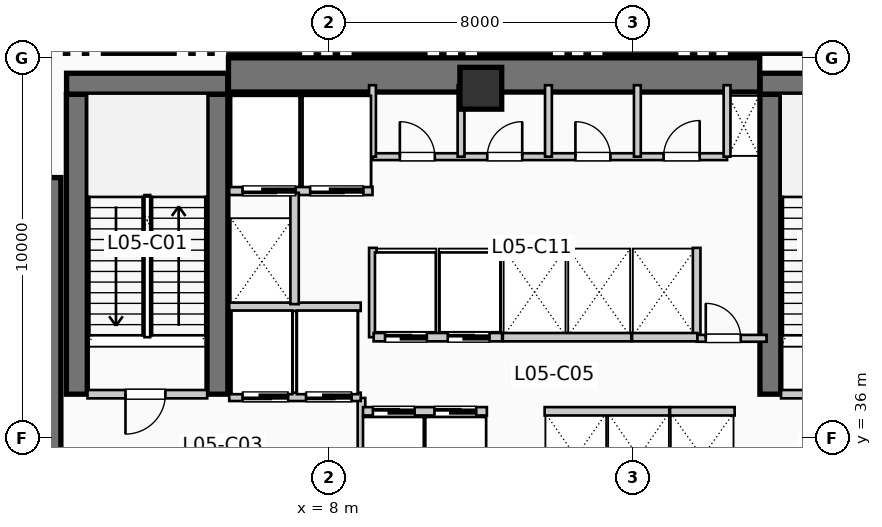
"""IFC4 building model, lengths in metres.
Left out: names, types, materials, properties, quantities, classifications, styles, units other than length and angle.
Written with IfcOpenShell. Run it as: python <this file> out.ifc"""

import sys

from ifc_helpers import new_model, si_unit, direction, frame, frame_2d, origin, origin_2d, place, context, subcontext, project, spatial, rectangle, extrude, element, fill, save


model = new_model("IFC4")
c1 = context("Model", 3, precision=1e-05, world=origin(), true_north=direction((0.0, 1.0)))
c2 = subcontext(c1, "Body", "Model", "MODEL_VIEW")
j1 = project(units=[si_unit("LENGTHUNIT", "METRE"), si_unit("PLANEANGLEUNIT", "RADIAN")], contexts=[c1])
p1 = place(None, origin())
s1 = spatial("IfcSite", under=j1, at=p1, CompositionType="ELEMENT")
p2 = place(p1, origin())
s2 = spatial("IfcBuilding", under=s1, at=p2, CompositionType="ELEMENT")
p3 = place(p2, frame((0.0, 0.0, 25.74)))
s3 = spatial("IfcBuildingStorey", under=s2, at=p3, CompositionType="ELEMENT", Elevation=25.74)
p4 = place(p3, frame((5.36, 45.55, 0.0), z_axis=(0.0, 0.0, 1.0), x_axis=(1.0, 0.0, 0.0)))
e1 = element("IfcWall", 1, at=p4, inside=s3, PredefinedType="SHEAR", context=c2, shape_type="SweptSolid", body=[
    extrude(rectangle(XDim=13.98, YDim=0.9, at=frame_2d((6.99, 0.0))), origin(), (0.0, 0.0, 1.0), 4.62),
])
p5 = place(p3, frame((0.5, 34.95, 0.0), z_axis=(0.0, 0.0, 1.0), x_axis=(0.0, 1.0, 0.0)))
e2 = element("IfcWall", 2, at=p5, inside=s3, PredefinedType="SHEAR", context=c2, shape_type="SweptSolid", body=[
    extrude(rectangle(XDim=7.9, YDim=0.9, at=frame_2d((3.95, 0.0))), origin(), (0.0, 0.0, 1.0), 4.62),
])
for number, where, z_axis, x_axis in (
    (3, (1.37, 37.15, 0.0), (0.0, 0.0, 1.0), (0.0, 1.0, 0.0)),
    (4, (5.07, 37.15, 0.0), (0.0, 0.0, 1.0), (0.0, 1.0, 0.0)),
):
    element("IfcWall", number, at=place(p3, frame(where, z_axis=z_axis, x_axis=x_axis)), inside=s3, PredefinedType="SHEAR", context=c2, shape_type="SweptSolid", body=[
        extrude(rectangle(XDim=7.89, YDim=0.55, at=frame_2d((3.945, 0.0))), origin(), (0.0, 0.0, 1.0), 4.62),
    ])
p6 = place(p3, frame((1.1, 45.32, 0.0), z_axis=(0.0, 0.0, 1.0), x_axis=(1.0, 0.0, 0.0)))
e5 = element("IfcWall", 5, at=p6, inside=s3, PredefinedType="SHEAR", context=c2, shape_type="SweptSolid", body=[
    extrude(rectangle(XDim=4.24, YDim=0.55, at=frame_2d((2.12, 0.0))), origin(), (0.0, 0.0, 1.0), 4.62),
])
p7 = place(p3, frame((19.62, 37.15, 0.0), z_axis=(0.0, 0.0, 1.0), x_axis=(0.0, 1.0, 0.0)))
e6 = element("IfcWall", 6, at=p7, inside=s3, PredefinedType="SHEAR", context=c2, shape_type="SweptSolid", body=[
    extrude(rectangle(XDim=7.89, YDim=0.55, at=frame_2d((3.945, 0.0))), origin(), (0.0, 0.0, 1.0), 4.62),
])
p8 = place(p3, frame((19.35, 45.32, 0.0), z_axis=(0.0, 0.0, 1.0), x_axis=(1.0, 0.0, 0.0)))
e7 = element("IfcWall", 7, at=p8, inside=s3, PredefinedType="SHEAR", context=c2, shape_type="SweptSolid", body=[
    extrude(rectangle(XDim=3.69, YDim=0.55, at=frame_2d((1.845, 0.0))), origin(), (0.0, 0.0, 1.0), 4.62),
])
p9 = place(p3, frame((12.0, 45.2, 0.0), z_axis=(0.0, 0.0, 1.0), x_axis=(1.0, 0.0, 0.0)))
e8 = element("IfcColumn", 8, at=p9, inside=s3, PredefinedType="COLUMN", context=c2, shape_type="SweptSolid", body=[
    extrude(rectangle(XDim=1.1, YDim=1.1, at=origin_2d()), origin(), (0.0, 0.0, 1.0), 4.62),
])
p10 = place(p3, frame((1.088, 47.834, 0.0), z_axis=(0.0, 0.0, 1.0), x_axis=(-0.707106781187, -0.707106781187, 0.0)))
e9 = element("IfcWall", 9, at=p10, inside=s3, PredefinedType="SOLIDWALL", context=c2, shape_type="SweptSolid", body=[
    extrude(rectangle(XDim=4.133, YDim=0.36, at=frame_2d((2.066, 0.0))), origin(), (0.0, 0.0, 1.0), 4.37),
])
p11 = place(p3, frame((1.65, 37.15, 0.0), z_axis=(0.0, 0.0, 1.0), x_axis=(1.0, 0.0, 0.0)))
e10 = element("IfcWall", 10, at=p11, inside=s3, PredefinedType="PARTITIONING", context=c2, shape_type="SweptSolid", body=[
    extrude(rectangle(XDim=3.15, YDim=0.22, at=frame_2d((1.575, 0.0))), origin(), (0.0, 0.0, 1.0), 4.37),
])
p12 = place(p11, frame((2.05, 0.0, 0.0), z_axis=(0.0, 0.0, 1.0), x_axis=(-1.0, 0.0, 0.0)))
e11 = element("IfcOpeningElement", 11, at=p12, cuts=e10, PredefinedType="OPENING", context=c2, shape_type="SweptSolid", body=[
    extrude(rectangle(XDim=1.05, YDim=2.15, at=frame_2d((0.525, 1.075))), frame((0.0, 0.12, 0.0), z_axis=(0.0, -1.0, 0.0), x_axis=(1.0, 0.0, 0.0)), (0.0, 0.0, 1.0), 0.24),
])
p13 = place(p3, frame((8.86, 34.55, 0.0), z_axis=(0.0, 0.0, 1.0), x_axis=(0.0, 1.0, 0.0)))
e12 = element("IfcWall", 12, at=p13, inside=s3, PredefinedType="PARTITIONING", context=c2, shape_type="SweptSolid", body=[
    extrude(rectangle(XDim=2.5, YDim=0.2, at=frame_2d((1.25, 0.0))), origin(), (0.0, 0.0, 1.0), 4.37),
])
p14 = place(p3, frame((19.9, 37.15, 0.0), z_axis=(0.0, 0.0, 1.0), x_axis=(1.0, 0.0, 0.0)))
e13 = element("IfcWall", 13, at=p14, inside=s3, PredefinedType="PARTITIONING", context=c2, shape_type="SweptSolid", body=[
    extrude(rectangle(XDim=3.15, YDim=0.22, at=frame_2d((1.575, 0.0))), origin(), (0.0, 0.0, 1.0), 4.37),
])
p15 = place(p14, frame((2.05, 0.0, 0.0), z_axis=(0.0, 0.0, 1.0), x_axis=(-1.0, 0.0, 0.0)))
e14 = element("IfcOpeningElement", 14, at=p15, cuts=e13, PredefinedType="OPENING", context=c2, shape_type="SweptSolid", body=[
    extrude(rectangle(XDim=1.05, YDim=2.15, at=frame_2d((0.525, 1.075))), frame((0.0, 0.12, 0.0), z_axis=(0.0, -1.0, 0.0), x_axis=(1.0, 0.0, 0.0)), (0.0, 0.0, 1.0), 0.24),
])
p16 = place(p3, frame((5.38, 37.08, 0.0), z_axis=(0.0, 0.0, 1.0), x_axis=(1.0, 0.0, 0.0)))
e15 = element("IfcWall", 15, at=p16, inside=s3, PredefinedType="PARTITIONING", context=c2, shape_type="SweptSolid", body=[
    extrude(rectangle(XDim=3.46, YDim=0.22, at=frame_2d((1.73, 0.0))), origin(), (0.0, 0.0, 1.0), 4.37),
])
p17 = place(p16, frame((1.55, 0.0, 0.0), z_axis=(0.0, 0.0, 1.0), x_axis=(-1.0, 0.0, 0.0)))
e16 = element("IfcOpeningElement", 16, at=p17, cuts=e15, PredefinedType="OPENING", context=c2, shape_type="SweptSolid", body=[
    extrude(rectangle(XDim=1.2, YDim=2.2, at=frame_2d((0.6, 1.1))), frame((0.0, 0.12, 0.0), z_axis=(0.0, -1.0, 0.0), x_axis=(1.0, 0.0, 0.0)), (0.0, 0.0, 1.0), 0.24),
])
p18 = place(p16, frame((3.22, 0.0, 0.0), z_axis=(0.0, 0.0, 1.0), x_axis=(-1.0, 0.0, 0.0)))
e17 = element("IfcOpeningElement", 17, at=p18, cuts=e15, PredefinedType="OPENING", context=c2, shape_type="SweptSolid", body=[
    extrude(rectangle(XDim=1.2, YDim=2.2, at=frame_2d((0.6, 1.1))), frame((0.0, 0.12, 0.0), z_axis=(0.0, -1.0, 0.0), x_axis=(1.0, 0.0, 0.0)), (0.0, 0.0, 1.0), 0.24),
])
p19 = place(p3, frame((5.38, 39.45, 0.0), z_axis=(0.0, 0.0, 1.0), x_axis=(1.0, 0.0, 0.0)))
e18 = element("IfcWall", 18, at=p19, inside=s3, PredefinedType="PARTITIONING", context=c2, shape_type="SweptSolid", body=[
    extrude(rectangle(XDim=3.46, YDim=0.22, at=frame_2d((1.73, 0.0))), origin(), (0.0, 0.0, 1.0), 4.37),
])
p20 = place(p3, frame((5.38, 42.5, 0.0), z_axis=(0.0, 0.0, 1.0), x_axis=(1.0, 0.0, 0.0)))
e19 = element("IfcWall", 19, at=p20, inside=s3, PredefinedType="PARTITIONING", context=c2, shape_type="SweptSolid", body=[
    extrude(rectangle(XDim=3.77, YDim=0.22, at=frame_2d((1.885, 0.0))), origin(), (0.0, 0.0, 1.0), 4.37),
])
p21 = place(p20, frame((1.75, 0.0, 0.0), z_axis=(0.0, 0.0, 1.0), x_axis=(-1.0, 0.0, 0.0)))
e20 = element("IfcOpeningElement", 20, at=p21, cuts=e19, PredefinedType="OPENING", context=c2, shape_type="SweptSolid", body=[
    extrude(rectangle(XDim=1.4, YDim=2.2, at=frame_2d((0.7, 1.1))), frame((0.0, 0.12, 0.0), z_axis=(0.0, -1.0, 0.0), x_axis=(1.0, 0.0, 0.0)), (0.0, 0.0, 1.0), 0.24),
])
p22 = place(p20, frame((3.53, 0.0, 0.0), z_axis=(0.0, 0.0, 1.0), x_axis=(-1.0, 0.0, 0.0)))
e21 = element("IfcOpeningElement", 21, at=p22, cuts=e19, PredefinedType="OPENING", context=c2, shape_type="SweptSolid", body=[
    extrude(rectangle(XDim=1.4, YDim=2.2, at=frame_2d((0.7, 1.1))), frame((0.0, 0.12, 0.0), z_axis=(0.0, -1.0, 0.0), x_axis=(1.0, 0.0, 0.0)), (0.0, 0.0, 1.0), 0.24),
])
p23 = place(p3, frame((7.1, 39.52, 0.0), z_axis=(0.0, 0.0, 1.0), x_axis=(0.0, 1.0, 0.0)))
e22 = element("IfcWall", 22, at=p23, inside=s3, PredefinedType="PARTITIONING", context=c2, shape_type="SweptSolid", body=[
    extrude(rectangle(XDim=2.93, YDim=0.22, at=frame_2d((1.465, 0.0))), origin(), (0.0, 0.0, 1.0), 4.37),
])
for number, where, z_axis, x_axis in (
    (23, (9.16, 38.65, 0.0), (0.0, 0.0, 1.0), (0.0, 1.0, 0.0)),
    (24, (17.68, 38.65, 0.0), (0.0, 0.0, 1.0), (0.0, 1.0, 0.0)),
):
    element("IfcWall", number, at=place(p3, frame(where, z_axis=z_axis, x_axis=x_axis)), inside=s3, PredefinedType="PARTITIONING", context=c2, shape_type="SweptSolid", body=[
        extrude(rectangle(XDim=2.35, YDim=0.2, at=frame_2d((1.175, 0.0))), origin(), (0.0, 0.0, 1.0), 4.37),
    ])
p24 = place(p3, frame((17.68, 38.62, 0.0), z_axis=(0.0, 0.0, 1.0), x_axis=(1.0, 0.0, 0.0)))
e25 = element("IfcWall", 25, at=p24, inside=s3, PredefinedType="PARTITIONING", context=c2, shape_type="SweptSolid", body=[
    extrude(rectangle(XDim=1.84, YDim=0.18, at=frame_2d((0.92, 0.0))), origin(), (0.0, 0.0, 1.0), 4.37),
])
p25 = place(p24, frame((0.24, 0.0, 0.0)))
e26 = element("IfcOpeningElement", 26, at=p25, cuts=e25, PredefinedType="OPENING", context=c2, shape_type="SweptSolid", body=[
    extrude(rectangle(XDim=0.92, YDim=2.1, at=frame_2d((0.46, 1.05))), frame((0.0, 0.1, 0.0), z_axis=(0.0, -1.0, 0.0), x_axis=(1.0, 0.0, 0.0)), (0.0, 0.0, 1.0), 0.2),
])
p26 = place(p3, frame((8.9, 36.7, 0.0), z_axis=(0.0, 0.0, 1.0), x_axis=(1.0, 0.0, 0.0)))
e27 = element("IfcWall", 27, at=p26, inside=s3, PredefinedType="PARTITIONING", context=c2, shape_type="SweptSolid", body=[
    extrude(rectangle(XDim=3.26, YDim=0.22, at=frame_2d((1.63, 0.0))), origin(), (0.0, 0.0, 1.0), 4.37),
])
p27 = place(p26, frame((0.26, 0.0, 0.0)))
e28 = element("IfcOpeningElement", 28, at=p27, cuts=e27, PredefinedType="OPENING", context=c2, shape_type="SweptSolid", body=[
    extrude(rectangle(XDim=1.1, YDim=2.2, at=frame_2d((0.55, 1.1))), frame((0.0, 0.12, 0.0), z_axis=(0.0, -1.0, 0.0), x_axis=(1.0, 0.0, 0.0)), (0.0, 0.0, 1.0), 0.24),
])
p28 = place(p26, frame((1.88, 0.0, 0.0)))
e29 = element("IfcOpeningElement", 29, at=p28, cuts=e27, PredefinedType="OPENING", context=c2, shape_type="SweptSolid", body=[
    extrude(rectangle(XDim=1.1, YDim=2.2, at=frame_2d((0.55, 1.1))), frame((0.0, 0.12, 0.0), z_axis=(0.0, -1.0, 0.0), x_axis=(1.0, 0.0, 0.0)), (0.0, 0.0, 1.0), 0.24),
])
p29 = place(p3, frame((9.18, 38.65, 0.0), z_axis=(0.0, 0.0, 1.0), x_axis=(1.0, 0.0, 0.0)))
e30 = element("IfcWall", 30, at=p29, inside=s3, PredefinedType="PARTITIONING", context=c2, shape_type="SweptSolid", body=[
    extrude(rectangle(XDim=3.38, YDim=0.22, at=frame_2d((1.69, 0.0))), origin(), (0.0, 0.0, 1.0), 4.37),
])
p30 = place(p29, frame((0.3, 0.0, 0.0)))
e31 = element("IfcOpeningElement", 31, at=p30, cuts=e30, PredefinedType="OPENING", context=c2, shape_type="SweptSolid", body=[
    extrude(rectangle(XDim=1.1, YDim=2.2, at=frame_2d((0.55, 1.1))), frame((0.0, 0.12, 0.0), z_axis=(0.0, -1.0, 0.0), x_axis=(1.0, 0.0, 0.0)), (0.0, 0.0, 1.0), 0.24),
])
p31 = place(p29, frame((1.95, 0.0, 0.0)))
e32 = element("IfcOpeningElement", 32, at=p31, cuts=e30, PredefinedType="OPENING", context=c2, shape_type="SweptSolid", body=[
    extrude(rectangle(XDim=1.1, YDim=2.2, at=frame_2d((0.55, 1.1))), frame((0.0, 0.12, 0.0), z_axis=(0.0, -1.0, 0.0), x_axis=(1.0, 0.0, 0.0)), (0.0, 0.0, 1.0), 0.24),
])
p32 = place(p3, frame((13.68, 36.7, 0.0), z_axis=(0.0, 0.0, 1.0), x_axis=(1.0, 0.0, 0.0)))
e33 = element("IfcWall", 33, at=p32, inside=s3, PredefinedType="PARTITIONING", context=c2, shape_type="SweptSolid", body=[
    extrude(rectangle(XDim=3.28, YDim=0.22, at=frame_2d((1.64, 0.0))), origin(), (0.0, 0.0, 1.0), 4.37),
])
p33 = place(p3, frame((12.58, 38.65, 0.0), z_axis=(0.0, 0.0, 1.0), x_axis=(1.0, 0.0, 0.0)))
e34 = element("IfcWall", 34, at=p33, inside=s3, PredefinedType="PARTITIONING", context=c2, shape_type="SweptSolid", body=[
    extrude(rectangle(XDim=3.38, YDim=0.22, at=frame_2d((1.69, 0.0))), origin(), (0.0, 0.0, 1.0), 4.37),
])
p34 = place(p3, frame((16.98, 36.7, 0.0), z_axis=(0.0, 0.0, 1.0), x_axis=(1.0, 0.0, 0.0)))
e35 = element("IfcWall", 35, at=p34, inside=s3, PredefinedType="PARTITIONING", context=c2, shape_type="SweptSolid", body=[
    extrude(rectangle(XDim=1.7, YDim=0.22, at=frame_2d((0.85, 0.0))), origin(), (0.0, 0.0, 1.0), 4.37),
])
p35 = place(p3, frame((15.98, 38.65, 0.0), z_axis=(0.0, 0.0, 1.0), x_axis=(1.0, 0.0, 0.0)))
e36 = element("IfcWall", 36, at=p35, inside=s3, PredefinedType="PARTITIONING", context=c2, shape_type="SweptSolid", body=[
    extrude(rectangle(XDim=1.72, YDim=0.22, at=frame_2d((0.86, 0.0))), origin(), (0.0, 0.0, 1.0), 4.37),
])
p36 = place(p3, frame((9.15, 43.4, 0.0), z_axis=(0.0, 0.0, 1.0), x_axis=(1.0, 0.0, 0.0)))
e37 = element("IfcWall", 37, at=p36, inside=s3, PredefinedType="PLUMBINGWALL", context=c2, shape_type="SweptSolid", body=[
    extrude(rectangle(XDim=9.33, YDim=0.18, at=frame_2d((4.665, 0.0))), origin(), (0.0, 0.0, 1.0), 4.37),
])
p37 = place(p36, frame((0.72, 0.0, 0.0)))
e38 = element("IfcOpeningElement", 38, at=p37, cuts=e37, PredefinedType="OPENING", context=c2, shape_type="SweptSolid", body=[
    extrude(rectangle(XDim=0.92, YDim=2.1, at=frame_2d((0.46, 1.05))), frame((0.0, 0.1, 0.0), z_axis=(0.0, -1.0, 0.0), x_axis=(1.0, 0.0, 0.0)), (0.0, 0.0, 1.0), 0.2),
])
p38 = place(p36, frame((3.02, 0.0, 0.0)))
e39 = element("IfcOpeningElement", 39, at=p38, cuts=e37, PredefinedType="OPENING", context=c2, shape_type="SweptSolid", body=[
    extrude(rectangle(XDim=0.92, YDim=2.1, at=frame_2d((0.46, 1.05))), frame((0.0, 0.1, 0.0), z_axis=(0.0, -1.0, 0.0), x_axis=(1.0, 0.0, 0.0)), (0.0, 0.0, 1.0), 0.2),
])
p39 = place(p36, frame((5.34, 0.0, 0.0)))
e40 = element("IfcOpeningElement", 40, at=p39, cuts=e37, PredefinedType="OPENING", context=c2, shape_type="SweptSolid", body=[
    extrude(rectangle(XDim=0.92, YDim=2.1, at=frame_2d((0.46, 1.05))), frame((0.0, 0.1, 0.0), z_axis=(0.0, -1.0, 0.0), x_axis=(1.0, 0.0, 0.0)), (0.0, 0.0, 1.0), 0.2),
])
p40 = place(p36, frame((7.66, 0.0, 0.0)))
e41 = element("IfcOpeningElement", 41, at=p40, cuts=e37, PredefinedType="OPENING", context=c2, shape_type="SweptSolid", body=[
    extrude(rectangle(XDim=0.95, YDim=2.1, at=frame_2d((0.475, 1.05))), frame((0.0, 0.1, 0.0), z_axis=(0.0, -1.0, 0.0), x_axis=(1.0, 0.0, 0.0)), (0.0, 0.0, 1.0), 0.2),
])
for number, where, z_axis, x_axis in (
    (42, (9.15, 43.4, 0.0), (0.0, 0.0, 1.0), (0.0, 1.0, 0.0)),
    (43, (18.48, 43.4, 0.0), (0.0, 0.0, 1.0), (0.0, 1.0, 0.0)),
    (44, (11.48, 43.4, 0.0), (0.0, 0.0, 1.0), (0.0, 1.0, 0.0)),
    (45, (13.78, 43.4, 0.0), (0.0, 0.0, 1.0), (0.0, 1.0, 0.0)),
    (46, (16.12, 43.4, 0.0), (0.0, 0.0, 1.0), (0.0, 1.0, 0.0)),
):
    element("IfcWall", number, at=place(p3, frame(where, z_axis=z_axis, x_axis=x_axis)), inside=s3, PredefinedType="PLUMBINGWALL", context=c2, shape_type="SweptSolid", body=[
        extrude(rectangle(XDim=1.88, YDim=0.18, at=frame_2d((0.94, 0.0))), origin(), (0.0, 0.0, 1.0), 4.37),
    ])
p41 = place(p12, origin())
e47 = element("IfcDoor", 47, at=p41, inside=s3, OperationType="SINGLE_SWING_LEFT", PredefinedType="DOOR", context=c2, shape_type="SweptSolid", body=[
    extrude(rectangle(XDim=1.05, YDim=2.15, at=frame_2d((0.525, 1.075))), frame((0.0, 0.025, 0.0), z_axis=(0.0, -1.0, 0.0), x_axis=(1.0, 0.0, 0.0)), (0.0, 0.0, 1.0), 0.05),
])
fill(e11, e47)
p42 = place(p17, origin())
e48 = element("IfcDoor", 48, at=p42, inside=s3, OperationType="SLIDING_TO_RIGHT", PredefinedType="DOOR", context=c2, shape_type="SweptSolid", body=[
    extrude(rectangle(XDim=1.2, YDim=2.2, at=frame_2d((0.6, 1.1))), frame((0.0, 0.025, 0.0), z_axis=(0.0, -1.0, 0.0), x_axis=(1.0, 0.0, 0.0)), (0.0, 0.0, 1.0), 0.05),
])
fill(e16, e48)
p43 = place(p18, origin())
e49 = element("IfcDoor", 49, at=p43, inside=s3, OperationType="SLIDING_TO_RIGHT", PredefinedType="DOOR", context=c2, shape_type="SweptSolid", body=[
    extrude(rectangle(XDim=1.2, YDim=2.2, at=frame_2d((0.6, 1.1))), frame((0.0, 0.025, 0.0), z_axis=(0.0, -1.0, 0.0), x_axis=(1.0, 0.0, 0.0)), (0.0, 0.0, 1.0), 0.05),
])
fill(e17, e49)
p44 = place(p21, origin())
e50 = element("IfcDoor", 50, at=p44, inside=s3, OperationType="SLIDING_TO_LEFT", PredefinedType="DOOR", context=c2, shape_type="SweptSolid", body=[
    extrude(rectangle(XDim=1.4, YDim=2.2, at=frame_2d((0.7, 1.1))), frame((0.0, 0.025, 0.0), z_axis=(0.0, -1.0, 0.0), x_axis=(1.0, 0.0, 0.0)), (0.0, 0.0, 1.0), 0.05),
])
fill(e20, e50)
p45 = place(p22, origin())
e51 = element("IfcDoor", 51, at=p45, inside=s3, OperationType="SLIDING_TO_LEFT", PredefinedType="DOOR", context=c2, shape_type="SweptSolid", body=[
    extrude(rectangle(XDim=1.4, YDim=2.2, at=frame_2d((0.7, 1.1))), frame((0.0, 0.025, 0.0), z_axis=(0.0, -1.0, 0.0), x_axis=(1.0, 0.0, 0.0)), (0.0, 0.0, 1.0), 0.05),
])
fill(e21, e51)
p46 = place(p25, origin())
e52 = element("IfcDoor", 52, at=p46, inside=s3, OperationType="SINGLE_SWING_LEFT", PredefinedType="DOOR", context=c2, shape_type="SweptSolid", body=[
    extrude(rectangle(XDim=0.92, YDim=2.1, at=frame_2d((0.46, 1.05))), frame((0.0, 0.025, 0.0), z_axis=(0.0, -1.0, 0.0), x_axis=(1.0, 0.0, 0.0)), (0.0, 0.0, 1.0), 0.05),
])
fill(e26, e52)
p47 = place(p27, origin())
e53 = element("IfcDoor", 53, at=p47, inside=s3, OperationType="SLIDING_TO_LEFT", PredefinedType="DOOR", context=c2, shape_type="SweptSolid", body=[
    extrude(rectangle(XDim=1.1, YDim=2.2, at=frame_2d((0.55, 1.1))), frame((0.0, 0.025, 0.0), z_axis=(0.0, -1.0, 0.0), x_axis=(1.0, 0.0, 0.0)), (0.0, 0.0, 1.0), 0.05),
])
fill(e28, e53)
p48 = place(p28, origin())
e54 = element("IfcDoor", 54, at=p48, inside=s3, OperationType="SLIDING_TO_LEFT", PredefinedType="DOOR", context=c2, shape_type="SweptSolid", body=[
    extrude(rectangle(XDim=1.1, YDim=2.2, at=frame_2d((0.55, 1.1))), frame((0.0, 0.025, 0.0), z_axis=(0.0, -1.0, 0.0), x_axis=(1.0, 0.0, 0.0)), (0.0, 0.0, 1.0), 0.05),
])
fill(e29, e54)
p49 = place(p30, origin())
e55 = element("IfcDoor", 55, at=p49, inside=s3, OperationType="SLIDING_TO_LEFT", PredefinedType="DOOR", context=c2, shape_type="SweptSolid", body=[
    extrude(rectangle(XDim=1.1, YDim=2.2, at=frame_2d((0.55, 1.1))), frame((0.0, 0.025, 0.0), z_axis=(0.0, -1.0, 0.0), x_axis=(1.0, 0.0, 0.0)), (0.0, 0.0, 1.0), 0.05),
])
fill(e31, e55)
p50 = place(p31, origin())
e56 = element("IfcDoor", 56, at=p50, inside=s3, OperationType="SLIDING_TO_LEFT", PredefinedType="DOOR", context=c2, shape_type="SweptSolid", body=[
    extrude(rectangle(XDim=1.1, YDim=2.2, at=frame_2d((0.55, 1.1))), frame((0.0, 0.025, 0.0), z_axis=(0.0, -1.0, 0.0), x_axis=(1.0, 0.0, 0.0)), (0.0, 0.0, 1.0), 0.05),
])
fill(e32, e56)
p51 = place(p37, origin())
e57 = element("IfcDoor", 57, at=p51, inside=s3, OperationType="SINGLE_SWING_LEFT", PredefinedType="DOOR", context=c2, shape_type="SweptSolid", body=[
    extrude(rectangle(XDim=0.92, YDim=2.1, at=frame_2d((0.46, 1.05))), frame((0.0, 0.025, 0.0), z_axis=(0.0, -1.0, 0.0), x_axis=(1.0, 0.0, 0.0)), (0.0, 0.0, 1.0), 0.05),
])
fill(e38, e57)
p52 = place(p38, origin())
e58 = element("IfcDoor", 58, at=p52, inside=s3, OperationType="SINGLE_SWING_RIGHT", PredefinedType="DOOR", context=c2, shape_type="SweptSolid", body=[
    extrude(rectangle(XDim=0.92, YDim=2.1, at=frame_2d((0.46, 1.05))), frame((0.0, 0.025, 0.0), z_axis=(0.0, -1.0, 0.0), x_axis=(1.0, 0.0, 0.0)), (0.0, 0.0, 1.0), 0.05),
])
fill(e39, e58)
p53 = place(p39, origin())
e59 = element("IfcDoor", 59, at=p53, inside=s3, OperationType="SINGLE_SWING_LEFT", PredefinedType="DOOR", context=c2, shape_type="SweptSolid", body=[
    extrude(rectangle(XDim=0.92, YDim=2.1, at=frame_2d((0.46, 1.05))), frame((0.0, 0.025, 0.0), z_axis=(0.0, -1.0, 0.0), x_axis=(1.0, 0.0, 0.0)), (0.0, 0.0, 1.0), 0.05),
])
fill(e40, e59)
p54 = place(p40, origin())
e60 = element("IfcDoor", 60, at=p54, inside=s3, OperationType="SINGLE_SWING_RIGHT", PredefinedType="DOOR", context=c2, shape_type="SweptSolid", body=[
    extrude(rectangle(XDim=0.95, YDim=2.1, at=frame_2d((0.475, 1.05))), frame((0.0, 0.025, 0.0), z_axis=(0.0, -1.0, 0.0), x_axis=(1.0, 0.0, 0.0)), (0.0, 0.0, 1.0), 0.05),
])
fill(e41, e60)
save(model, sys.argv[1])
